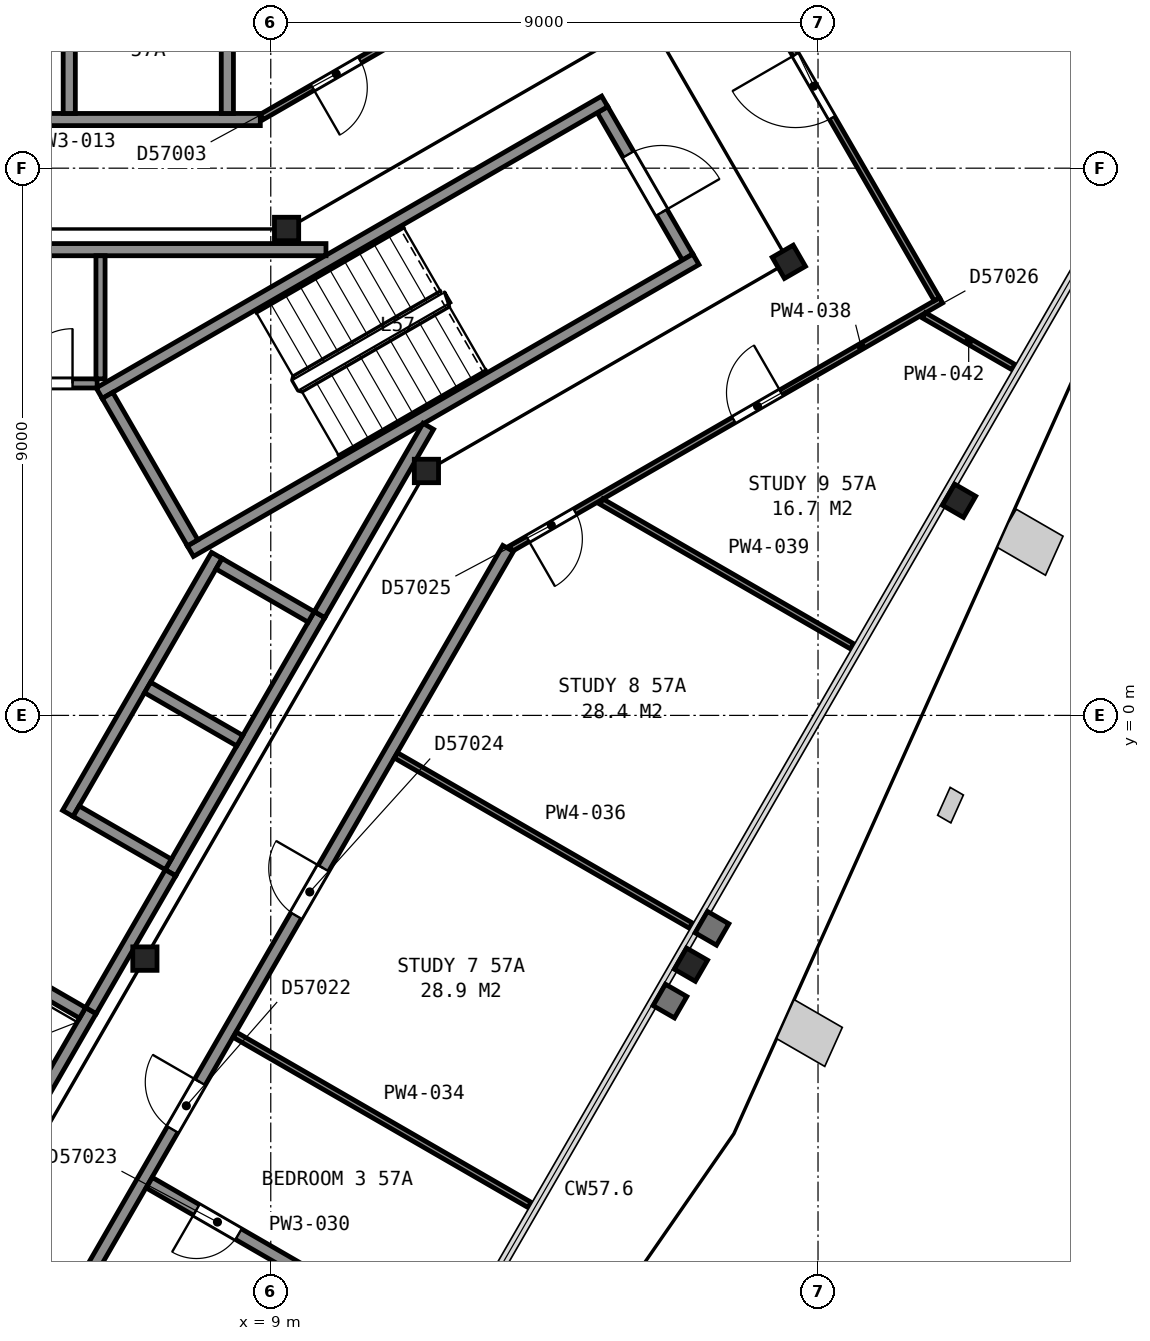
"""IFC4 building model, lengths in metres.
Left out: names, types, materials, properties, quantities, classifications, styles, units other than length and angle.
Written with IfcOpenShell. Run it as: python <this file> out.ifc"""

import sys

from ifc_helpers import new_model, si_unit, direction, frame, frame_2d, origin, origin_2d, place, context, subcontext, project, spatial, rectangle, i_section, extrude, element, fill, save


model = new_model("IFC4")
c1 = context("Model", 3, precision=1e-05, world=origin(), true_north=direction((0.0, 1.0)))
c2 = subcontext(c1, "Body", "Model", "MODEL_VIEW")
j1 = project(units=[si_unit("LENGTHUNIT", "METRE"), si_unit("PLANEANGLEUNIT", "RADIAN")], contexts=[c1])
p1 = place(None, origin())
s1 = spatial("IfcSite", under=j1, at=p1, CompositionType="ELEMENT")
p2 = place(p1, origin())
s2 = spatial("IfcBuilding", under=s1, at=p2, CompositionType="ELEMENT")
p3 = place(p2, frame((0.0, 0.0, 228.6)))
s3 = spatial("IfcBuildingStorey", under=s2, at=p3, CompositionType="ELEMENT", Elevation=228.6)
p4 = place(p3, frame((15.91, -4.1, 0.0), z_axis=(0.0, 0.0, 1.0), x_axis=(-0.5, -0.866025403784, 0.0)))
e1 = element("IfcColumn", 1, at=p4, inside=s3, PredefinedType="COLUMN", context=c2, shape_type="SweptSolid", body=[
    extrude(i_section(OverallWidth=0.401, OverallDepth=0.399, WebThickness=0.025, FlangeThickness=0.04, FilletRadius=0.015, at=origin_2d()), origin(), (0.0, 0.0, 1.0), 3.665),
])
p5 = place(p3, frame((20.32, 3.53, 0.0), z_axis=(0.0, 0.0, 1.0), x_axis=(-0.5, -0.866025403784, 0.0)))
e2 = element("IfcColumn", 2, at=p5, inside=s3, PredefinedType="COLUMN", context=c2, shape_type="SweptSolid", body=[
    extrude(i_section(OverallWidth=0.401, OverallDepth=0.399, WebThickness=0.025, FlangeThickness=0.04, FilletRadius=0.015, at=origin_2d()), origin(), (0.0, 0.0, 1.0), 3.66),
])
p6 = place(p3, frame((11.56, 4.02, 0.0), z_axis=(0.0, 0.0, 1.0), x_axis=(1.0, 0.0, 0.0)))
e3 = element("IfcColumn", 3, at=p6, inside=s3, PredefinedType="COLUMN", context=c2, shape_type="SweptSolid", body=[
    extrude(i_section(OverallWidth=0.399, OverallDepth=0.386, WebThickness=0.021, FlangeThickness=0.033, FilletRadius=0.015, at=origin_2d()), origin(), (0.0, 0.0, 1.0), 3.7),
])
p7 = place(p3, frame((17.52, 7.46, 0.0), z_axis=(0.0, 0.0, 1.0), x_axis=(0.5, -0.866025403784, 0.0)))
e4 = element("IfcColumn", 4, at=p7, inside=s3, PredefinedType="COLUMN", context=c2, shape_type="SweptSolid", body=[
    extrude(i_section(OverallWidth=0.401, OverallDepth=0.399, WebThickness=0.025, FlangeThickness=0.04, FilletRadius=0.015, at=origin_2d()), origin(), (0.0, 0.0, 1.0), 3.7),
])
for number, where, z_axis, x_axis in (
    (5, (9.26, 8.0, 0.0), (0.0, 0.0, 1.0), (1.0, 0.0, 0.0)),
    (6, (6.93, -4.0, 0.0), (0.0, 0.0, 1.0), (1.0, 0.0, 0.0)),
):
    element("IfcColumn", number, at=place(p3, frame(where, z_axis=z_axis, x_axis=x_axis)), inside=s3, PredefinedType="COLUMN", context=c2, shape_type="SweptSolid", body=[
        extrude(i_section(OverallWidth=0.399, OverallDepth=0.386, WebThickness=0.021, FlangeThickness=0.033, FilletRadius=0.015, at=origin_2d()), origin(), (0.0, 0.0, 1.0), 3.7),
    ])
p8 = place(p3, frame((15.855, 7.538, 0.0), z_axis=(0.0, 0.0, 1.0), x_axis=(-0.500049511043, 0.865996816683, 0.0)))
e7 = element("IfcWall", 7, at=p8, inside=s3, PredefinedType="PARTITIONING", context=c2, shape_type="SweptSolid", body=[
    extrude(rectangle(XDim=2.8, YDim=0.2, at=frame_2d((1.4, 0.0))), origin(), (0.0, 0.0, 1.0), 3.45),
])
p9 = place(p8, frame((0.85, 0.0, 0.0)))
e8 = element("IfcOpeningElement", 8, at=p9, cuts=e7, PredefinedType="OPENING", context=c2, shape_type="SweptSolid", body=[
    extrude(rectangle(XDim=1.1, YDim=2.1, at=frame_2d((0.55, 1.05))), frame((0.0, 0.11, 0.0), z_axis=(0.0, -1.0, 0.0), x_axis=(1.0, 0.0, 0.0)), (0.0, 0.0, 1.0), 0.22),
])
for number, where, z_axis, x_axis in (
    (9, (6.178, 5.299, 0.0), (0.0, 0.0, 1.0), (0.866, 0.5, 0.0)),
    (10, (7.678, 2.701, 0.0), (0.0, 0.0, 1.0), (0.866, 0.5, 0.0)),
):
    element("IfcWall", number, at=place(p3, frame(where, z_axis=z_axis, x_axis=x_axis)), inside=s3, PredefinedType="PARTITIONING", context=c2, shape_type="SweptSolid", body=[
        extrude(rectangle(XDim=9.6, YDim=0.2, at=frame_2d((4.8, 0.0))), origin(), (0.0, 0.0, 1.0), 3.45),
    ])
p10 = place(p3, frame((7.715, 2.838, 0.0), z_axis=(0.0, 0.0, 1.0), x_axis=(-0.500049511043, 0.865996816683, 0.0)))
e11 = element("IfcWall", 11, at=p10, inside=s3, PredefinedType="PARTITIONING", context=c2, shape_type="SweptSolid", body=[
    extrude(rectangle(XDim=2.8, YDim=0.2, at=frame_2d((1.4, 0.0))), origin(), (0.0, 0.0, 1.0), 3.45),
])
p11 = place(p3, frame((4.766, -7.065, 0.0), z_axis=(0.0, 0.0, 1.0), x_axis=(0.499948979701, 0.866054858364, 0.0)))
e12 = element("IfcWall", 12, at=p11, inside=s3, PredefinedType="PARTITIONING", context=c2, shape_type="SweptSolid", body=[
    extrude(rectangle(XDim=2.55, YDim=0.2, at=frame_2d((1.275, 0.0))), origin(), (0.0, 0.0, 1.0), 3.7),
])
p12 = place(p3, frame((7.351, -2.587, 0.0), z_axis=(0.0, 0.0, 1.0), x_axis=(0.500002801628, 0.866023786258, 0.0)))
e13 = element("IfcWall", 13, at=p12, inside=s3, PredefinedType="PARTITIONING", context=c2, shape_type="SweptSolid", body=[
    extrude(rectangle(XDim=4.9, YDim=0.2, at=frame_2d((2.45, 0.0))), origin(), (0.0, 0.0, 1.0), 3.7),
])
p13 = place(p3, frame((5.663, -1.612, 0.0), z_axis=(0.0, 0.0, 1.0), x_axis=(0.49998122708, 0.866036242063, 0.0)))
e14 = element("IfcWall", 14, at=p13, inside=s3, PredefinedType="PARTITIONING", context=c2, shape_type="SweptSolid", body=[
    extrude(rectangle(XDim=4.9, YDim=0.2, at=frame_2d((2.45, 0.0))), origin(), (0.0, 0.0, 1.0), 3.7),
])
p14 = place(p3, frame((9.665, 1.62, 0.0), z_axis=(0.0, 0.0, 1.0), x_axis=(-0.866002029911, 0.500040482552, 0.0)))
e15 = element("IfcWall", 15, at=p14, inside=s3, PredefinedType="PARTITIONING", context=c2, shape_type="SweptSolid", body=[
    extrude(rectangle(XDim=1.75, YDim=0.2, at=frame_2d((0.875, 0.0))), origin(), (0.0, 0.0, 1.0), 3.7),
])
for number, where, z_axis, x_axis in (
    (16, (8.49, -0.416, 0.0), (0.0, 0.0, 1.0), (-0.866, 0.5, 0.0)),
    (17, (7.315, -2.451, 0.0), (0.0, 0.0, 1.0), (-0.866, 0.5, 0.0)),
):
    element("IfcWall", number, at=place(p3, frame(where, z_axis=z_axis, x_axis=x_axis)), inside=s3, PredefinedType="PARTITIONING", context=c2, shape_type="SweptSolid", body=[
        extrude(rectangle(XDim=1.75, YDim=0.2, at=frame_2d((0.875, 0.0))), origin(), (0.0, 0.0, 1.0), 3.7),
    ])
p15 = place(p3, frame((5.905, -4.893, 0.0), z_axis=(0.0, 0.0, 1.0), x_axis=(-0.866002029911, 0.500040482552, 0.0)))
e18 = element("IfcWall", 18, at=p15, inside=s3, PredefinedType="PARTITIONING", context=c2, shape_type="SweptSolid", body=[
    extrude(rectangle(XDim=1.75, YDim=0.2, at=frame_2d((0.875, 0.0))), origin(), (0.0, 0.0, 1.0), 3.7),
])
p16 = place(p3, frame((-3.933, 7.66, 0.0), z_axis=(0.0, 0.0, 1.0), x_axis=(1.0, 0.0, 0.0)))
e19 = element("IfcWall", 19, at=p16, inside=s3, PredefinedType="PARTITIONING", context=c2, shape_type="SweptSolid", body=[
    extrude(rectangle(XDim=13.841, YDim=0.2, at=frame_2d((6.92, 0.0))), origin(), (0.0, 0.0, 1.0), 3.45),
])
p17 = place(p3, frame((0.925, 5.46, 0.0), z_axis=(0.0, 0.0, 1.0), x_axis=(1.0, 0.0, 0.0)))
e20 = element("IfcWall", 20, at=p17, inside=s3, PredefinedType="PARTITIONING", context=c2, shape_type="SweptSolid", body=[
    extrude(rectangle(XDim=5.22, YDim=0.15, at=frame_2d((2.61, 0.0))), origin(), (0.0, 0.0, 1.0), 3.45),
])
p18 = place(p17, frame((3.915, 0.0, 0.0)))
e21 = element("IfcOpeningElement", 21, at=p18, cuts=e20, PredefinedType="OPENING", context=c2, shape_type="SweptSolid", body=[
    extrude(rectangle(XDim=0.9, YDim=2.1, at=frame_2d((0.45, 1.05))), frame((0.0, 0.085, 0.0), z_axis=(0.0, -1.0, 0.0), x_axis=(1.0, 0.0, 0.0)), (0.0, 0.0, 1.0), 0.17),
])
p19 = place(p3, frame((6.042, -4.855, 0.0), z_axis=(0.0, 0.0, 1.0), x_axis=(0.500252727967, 0.865879442048, 0.0)))
e22 = element("IfcWall", 22, at=p19, inside=s3, PredefinedType="PARTITIONING", context=c2, shape_type="SweptSolid", body=[
    extrude(rectangle(XDim=2.617, YDim=0.2, at=frame_2d((1.309, 0.0))), origin(), (0.0, 0.0, 1.0), 3.45),
])
p20 = place(p3, frame((6.2, 5.535, 0.0), z_axis=(0.0, 0.0, 1.0), x_axis=(0.0, 1.0, 0.0)))
e23 = element("IfcWall", 23, at=p20, inside=s3, PredefinedType="PARTITIONING", context=c2, shape_type="SweptSolid", body=[
    extrude(rectangle(XDim=2.025, YDim=0.15, at=frame_2d((1.013, 0.0))), origin(), (0.0, 0.0, 1.0), 3.45),
])
p21 = place(p3, frame((9.803, 1.658, 0.0), z_axis=(0.0, 0.0, 1.0), x_axis=(0.499943114462, 0.866058244174, 0.0)))
e24 = element("IfcWall", 24, at=p21, inside=s3, PredefinedType="PARTITIONING", context=c2, shape_type="SweptSolid", body=[
    extrude(rectangle(XDim=3.576, YDim=0.2, at=frame_2d((1.788, 0.0))), origin(), (0.0, 0.0, 1.0), 3.45),
])
p22 = place(p3, frame((-8.828, 9.8, 0.0), z_axis=(0.0, 0.0, 1.0), x_axis=(1.0, 0.0, 0.0)))
e25 = element("IfcWall", 25, at=p22, inside=s3, PredefinedType="PARTITIONING", context=c2, shape_type="SweptSolid", body=[
    extrude(rectangle(XDim=17.656, YDim=0.2, at=frame_2d((8.828, 0.0))), origin(), (0.0, 0.0, 1.0), 2.713),
])
p23 = place(p22, frame((10.658, 0.0, 0.0)))
e26 = element("IfcOpeningElement", 26, at=p23, cuts=e25, PredefinedType="OPENING", context=c2, shape_type="SweptSolid", body=[
    extrude(rectangle(XDim=0.9, YDim=2.1, at=frame_2d((0.45, 1.05))), frame((0.0, 0.11, 0.0), z_axis=(0.0, -1.0, 0.0), x_axis=(1.0, 0.0, 0.0)), (0.0, 0.0, 1.0), 0.22),
])
p24 = place(p22, frame((6.825, 0.0, 0.0)))
e27 = element("IfcOpeningElement", 27, at=p24, cuts=e25, PredefinedType="OPENING", context=c2, shape_type="SweptSolid", body=[
    extrude(rectangle(XDim=0.9, YDim=2.1, at=frame_2d((0.45, 1.05))), frame((0.0, 0.11, 0.0), z_axis=(0.0, -1.0, 0.0), x_axis=(1.0, 0.0, 0.0)), (0.0, 0.0, 1.0), 0.22),
])
p25 = place(p22, frame((1.95, 0.0, 0.0)))
e28 = element("IfcOpeningElement", 28, at=p25, cuts=e25, PredefinedType="OPENING", context=c2, shape_type="SweptSolid", body=[
    extrude(rectangle(XDim=0.9, YDim=2.1, at=frame_2d((0.45, 1.05))), frame((0.0, 0.11, 0.0), z_axis=(0.0, -1.0, 0.0), x_axis=(1.0, 0.0, 0.0)), (0.0, 0.0, 1.0), 0.22),
])
p26 = place(p3, frame((12.903, 2.745, 0.0), z_axis=(0.0, 0.0, 1.0), x_axis=(-0.499999743747, -0.866025551732, 0.0)))
e29 = element("IfcWall", 29, at=p26, inside=s3, PredefinedType="PARTITIONING", context=c2, shape_type="SweptSolid", body=[
    extrude(rectangle(XDim=17.656, YDim=0.2, at=frame_2d((8.828, 0.0))), origin(), (0.0, 0.0, 1.0), 2.713),
])
p27 = place(p26, frame((10.134, 0.0, 0.0)))
e30 = element("IfcOpeningElement", 30, at=p27, cuts=e29, PredefinedType="OPENING", context=c2, shape_type="SweptSolid", body=[
    extrude(rectangle(XDim=0.9, YDim=2.1, at=frame_2d((0.45, 1.05))), frame((0.0, 0.11, 0.0), z_axis=(0.0, -1.0, 0.0), x_axis=(1.0, 0.0, 0.0)), (0.0, 0.0, 1.0), 0.22),
])
p28 = place(p26, frame((6.073, 0.0, 0.0)))
e31 = element("IfcOpeningElement", 31, at=p28, cuts=e29, PredefinedType="OPENING", context=c2, shape_type="SweptSolid", body=[
    extrude(rectangle(XDim=0.9, YDim=2.1, at=frame_2d((0.45, 1.05))), frame((0.0, 0.11, 0.0), z_axis=(0.0, -1.0, 0.0), x_axis=(1.0, 0.0, 0.0)), (0.0, 0.0, 1.0), 0.22),
])
p29 = place(p3, frame((5.686, 9.9, 0.0), z_axis=(0.0, 0.0, 1.0), x_axis=(0.0, 1.0, 0.0)))
e32 = element("IfcWall", 32, at=p29, inside=s3, PredefinedType="PARTITIONING", context=c2, shape_type="SweptSolid", body=[
    extrude(rectangle(XDim=5.606, YDim=0.2, at=frame_2d((2.803, 0.0))), origin(), (0.0, 0.0, 1.0), 2.713),
])
p30 = place(p3, frame((9.423, -9.083, 0.0), z_axis=(0.0, 0.0, 1.0), x_axis=(-0.866041588165, 0.499971966783, 0.0)))
e33 = element("IfcWall", 33, at=p30, inside=s3, PredefinedType="PARTITIONING", context=c2, shape_type="SweptSolid", body=[
    extrude(rectangle(XDim=2.795, YDim=0.2, at=frame_2d((1.397, 0.0))), origin(), (0.0, 0.0, 1.0), 2.713),
])
p31 = place(p30, frame((1.1, 0.0, 0.0)))
e34 = element("IfcOpeningElement", 34, at=p31, cuts=e33, PredefinedType="OPENING", context=c2, shape_type="SweptSolid", body=[
    extrude(rectangle(XDim=0.8, YDim=2.1, at=frame_2d((0.4, 1.05))), frame((0.0, 0.11, 0.0), z_axis=(0.0, -1.0, 0.0), x_axis=(1.0, 0.0, 0.0)), (0.0, 0.0, 1.0), 0.22),
])
p32 = place(p3, frame((8.286, 9.9, 0.0), z_axis=(0.0, 0.0, 1.0), x_axis=(0.0, 1.0, 0.0)))
e35 = element("IfcWall", 35, at=p32, inside=s3, PredefinedType="PARTITIONING", context=c2, shape_type="SweptSolid", body=[
    extrude(rectangle(XDim=3.18, YDim=0.2, at=frame_2d((1.59, 0.0))), origin(), (0.0, 0.0, 1.0), 2.713),
])
p33 = place(p3, frame((8.407, -5.251, 0.0), z_axis=(0.0, 0.0, 1.0), x_axis=(0.866061432277, -0.499937591627, 0.0)))
e36 = element("IfcWall", 36, at=p33, inside=s3, PredefinedType="PARTITIONING", context=c2, shape_type="SweptSolid", body=[
    extrude(rectangle(XDim=5.599, YDim=0.1, at=frame_2d((2.8, 0.0))), origin(), (0.0, 0.0, 1.0), 2.713),
])
p34 = place(p3, frame((8.852, 9.843, 0.0), z_axis=(0.0, 0.0, 1.0), x_axis=(0.866088973199, 0.499889878377, 0.0)))
e37 = element("IfcWall", 37, at=p34, inside=s3, PredefinedType="PARTITIONING", context=c2, shape_type="SweptSolid", body=[
    extrude(rectangle(XDim=8.163, YDim=0.1, at=frame_2d((4.082, 0.0))), origin(), (0.0, 0.0, 1.0), 2.713),
])
p35 = place(p34, frame((4.865, 0.0, 0.0)))
e38 = element("IfcOpeningElement", 38, at=p35, cuts=e37, PredefinedType="OPENING", context=c2, shape_type="SweptSolid", body=[
    extrude(rectangle(XDim=0.9, YDim=2.1, at=frame_2d((0.45, 1.05))), frame((0.0, 0.06, 0.0), z_axis=(0.0, -1.0, 0.0), x_axis=(1.0, 0.0, 0.0)), (0.0, 0.0, 1.0), 0.12),
])
p36 = place(p34, frame((0.965, 0.0, 0.0)))
e39 = element("IfcOpeningElement", 39, at=p36, cuts=e37, PredefinedType="OPENING", context=c2, shape_type="SweptSolid", body=[
    extrude(rectangle(XDim=0.9, YDim=2.1, at=frame_2d((0.45, 1.05))), frame((0.0, 0.06, 0.0), z_axis=(0.0, -1.0, 0.0), x_axis=(1.0, 0.0, 0.0)), (0.0, 0.0, 1.0), 0.12),
])
p37 = place(p3, frame((11.059, -0.657, 0.0), z_axis=(0.0, 0.0, 1.0), x_axis=(0.866064348871, -0.499932539064, 0.0)))
e40 = element("IfcWall", 40, at=p37, inside=s3, PredefinedType="PARTITIONING", context=c2, shape_type="SweptSolid", body=[
    extrude(rectangle(XDim=5.6, YDim=0.1, at=frame_2d((2.8, 0.0))), origin(), (0.0, 0.0, 1.0), 2.713),
])
p38 = place(p3, frame((20.023, 6.826, 0.0), z_axis=(0.0, 0.0, 1.0), x_axis=(-0.86608949446, -0.499888975259, 0.0)))
e41 = element("IfcWall", 41, at=p38, inside=s3, PredefinedType="PARTITIONING", context=c2, shape_type="SweptSolid", body=[
    extrude(rectangle(XDim=8.165, YDim=0.1, at=frame_2d((4.083, 0.0))), origin(), (0.0, 0.0, 1.0), 2.713),
])
p39 = place(p38, frame((6.95, 0.0, 0.0)))
e42 = element("IfcOpeningElement", 42, at=p39, cuts=e41, PredefinedType="OPENING", context=c2, shape_type="SweptSolid", body=[
    extrude(rectangle(XDim=0.9, YDim=2.1, at=frame_2d((0.45, 1.05))), frame((0.0, 0.06, 0.0), z_axis=(0.0, -1.0, 0.0), x_axis=(1.0, 0.0, 0.0)), (0.0, 0.0, 1.0), 0.12),
])
p40 = place(p38, frame((3.035, 0.0, 0.0)))
e43 = element("IfcOpeningElement", 43, at=p40, cuts=e41, PredefinedType="OPENING", context=c2, shape_type="SweptSolid", body=[
    extrude(rectangle(XDim=0.9, YDim=2.1, at=frame_2d((0.45, 1.05))), frame((0.0, 0.06, 0.0), z_axis=(0.0, -1.0, 0.0), x_axis=(1.0, 0.0, 0.0)), (0.0, 0.0, 1.0), 0.12),
])
p41 = place(p3, frame((14.438, 3.517, 0.0), z_axis=(0.0, 0.0, 1.0), x_axis=(0.866006230416, -0.500033207779, 0.0)))
e44 = element("IfcWall", 44, at=p41, inside=s3, PredefinedType="PARTITIONING", context=c2, shape_type="SweptSolid", body=[
    extrude(rectangle(XDim=4.76, YDim=0.1, at=frame_2d((2.38, 0.0))), origin(), (0.0, 0.0, 1.0), 2.713),
])
p42 = place(p3, frame((15.903, 13.855, 0.0), z_axis=(0.0, 0.0, 1.0), x_axis=(0.500415732313, -0.865785247537, 0.0)))
e45 = element("IfcWall", 45, at=p42, inside=s3, PredefinedType="PARTITIONING", context=c2, shape_type="SweptSolid", body=[
    extrude(rectangle(XDim=8.097, YDim=0.1, at=frame_2d((4.049, 0.0))), origin(), (0.0, 0.0, 1.0), 2.713),
])
p43 = place(p42, frame((3.45, 0.0, 0.0)))
e46 = element("IfcOpeningElement", 46, at=p43, cuts=e45, PredefinedType="OPENING", context=c2, shape_type="SweptSolid", body=[
    extrude(rectangle(XDim=1.2, YDim=2.1, at=frame_2d((0.6, 1.05))), frame((0.0, 0.06, 0.0), z_axis=(0.0, -1.0, 0.0), x_axis=(1.0, 0.0, 0.0)), (0.0, 0.0, 1.0), 0.12),
])
p44 = place(p3, frame((19.743, 6.579, 0.0), z_axis=(0.0, 0.0, 1.0), x_axis=(0.866003515251, -0.500037910135, 0.0)))
e47 = element("IfcWall", 47, at=p44, inside=s3, PredefinedType="PARTITIONING", context=c2, shape_type="SweptSolid", body=[
    extrude(rectangle(XDim=1.697, YDim=0.1, at=frame_2d((0.849, 0.0))), origin(), (0.0, 0.0, 1.0), 2.713),
])
p45 = place(p9, origin())
e48 = element("IfcDoor", 48, at=p45, inside=s3, OperationType="SINGLE_SWING_LEFT", PredefinedType="DOOR", context=c2, shape_type="SweptSolid", body=[
    extrude(rectangle(XDim=1.1, YDim=2.1, at=frame_2d((0.55, 1.05))), frame((0.0, 0.025, 0.0), z_axis=(0.0, -1.0, 0.0), x_axis=(1.0, 0.0, 0.0)), (0.0, 0.0, 1.0), 0.05),
])
fill(e8, e48)
p46 = place(p18, origin())
e49 = element("IfcDoor", 49, at=p46, inside=s3, OperationType="SINGLE_SWING_RIGHT", PredefinedType="DOOR", context=c2, shape_type="SweptSolid", body=[
    extrude(rectangle(XDim=0.9, YDim=2.1, at=frame_2d((0.45, 1.05))), frame((0.0, 0.025, 0.0), z_axis=(0.0, -1.0, 0.0), x_axis=(1.0, 0.0, 0.0)), (0.0, 0.0, 1.0), 0.05),
])
fill(e21, e49)
p47 = place(p27, origin())
e50 = element("IfcDoor", 50, at=p47, inside=s3, OperationType="SINGLE_SWING_LEFT", PredefinedType="DOOR", context=c2, shape_type="SweptSolid", body=[
    extrude(rectangle(XDim=0.9, YDim=2.1, at=frame_2d((0.45, 1.05))), frame((0.0, 0.025, 0.0), z_axis=(0.0, -1.0, 0.0), x_axis=(1.0, 0.0, 0.0)), (0.0, 0.0, 1.0), 0.05),
])
fill(e30, e50)
p48 = place(p28, origin())
e51 = element("IfcDoor", 51, at=p48, inside=s3, OperationType="SINGLE_SWING_LEFT", PredefinedType="DOOR", context=c2, shape_type="SweptSolid", body=[
    extrude(rectangle(XDim=0.9, YDim=2.1, at=frame_2d((0.45, 1.05))), frame((0.0, 0.025, 0.0), z_axis=(0.0, -1.0, 0.0), x_axis=(1.0, 0.0, 0.0)), (0.0, 0.0, 1.0), 0.05),
])
fill(e31, e51)
p49 = place(p31, origin())
e52 = element("IfcDoor", 52, at=p49, inside=s3, OperationType="SINGLE_SWING_RIGHT", PredefinedType="DOOR", context=c2, shape_type="SweptSolid", body=[
    extrude(rectangle(XDim=0.8, YDim=2.1, at=frame_2d((0.4, 1.05))), frame((0.0, 0.025, 0.0), z_axis=(0.0, -1.0, 0.0), x_axis=(1.0, 0.0, 0.0)), (0.0, 0.0, 1.0), 0.05),
])
fill(e34, e52)
p50 = place(p36, origin())
e53 = element("IfcDoor", 53, at=p50, inside=s3, OperationType="SINGLE_SWING_LEFT", PredefinedType="DOOR", context=c2, shape_type="SweptSolid", body=[
    extrude(rectangle(XDim=0.9, YDim=2.1, at=frame_2d((0.45, 1.05))), frame((0.0, 0.025, 0.0), z_axis=(0.0, -1.0, 0.0), x_axis=(1.0, 0.0, 0.0)), (0.0, 0.0, 1.0), 0.05),
])
fill(e39, e53)
p51 = place(p39, origin())
e54 = element("IfcDoor", 54, at=p51, inside=s3, OperationType="SINGLE_SWING_RIGHT", PredefinedType="DOOR", context=c2, shape_type="SweptSolid", body=[
    extrude(rectangle(XDim=0.9, YDim=2.1, at=frame_2d((0.45, 1.05))), frame((0.0, 0.025, 0.0), z_axis=(0.0, -1.0, 0.0), x_axis=(1.0, 0.0, 0.0)), (0.0, 0.0, 1.0), 0.05),
])
fill(e42, e54)
p52 = place(p40, origin())
e55 = element("IfcDoor", 55, at=p52, inside=s3, OperationType="SINGLE_SWING_LEFT", PredefinedType="DOOR", context=c2, shape_type="SweptSolid", body=[
    extrude(rectangle(XDim=0.9, YDim=2.1, at=frame_2d((0.45, 1.05))), frame((0.0, 0.025, 0.0), z_axis=(0.0, -1.0, 0.0), x_axis=(1.0, 0.0, 0.0)), (0.0, 0.0, 1.0), 0.05),
])
fill(e43, e55)
p53 = place(p43, origin())
e56 = element("IfcDoor", 56, at=p53, inside=s3, OperationType="SINGLE_SWING_LEFT", PredefinedType="DOOR", context=c2, shape_type="SweptSolid", body=[
    extrude(rectangle(XDim=1.2, YDim=2.1, at=frame_2d((0.6, 1.05))), frame((0.0, 0.025, 0.0), z_axis=(0.0, -1.0, 0.0), x_axis=(1.0, 0.0, 0.0)), (0.0, 0.0, 1.0), 0.05),
])
fill(e46, e56)
save(model, sys.argv[1])
